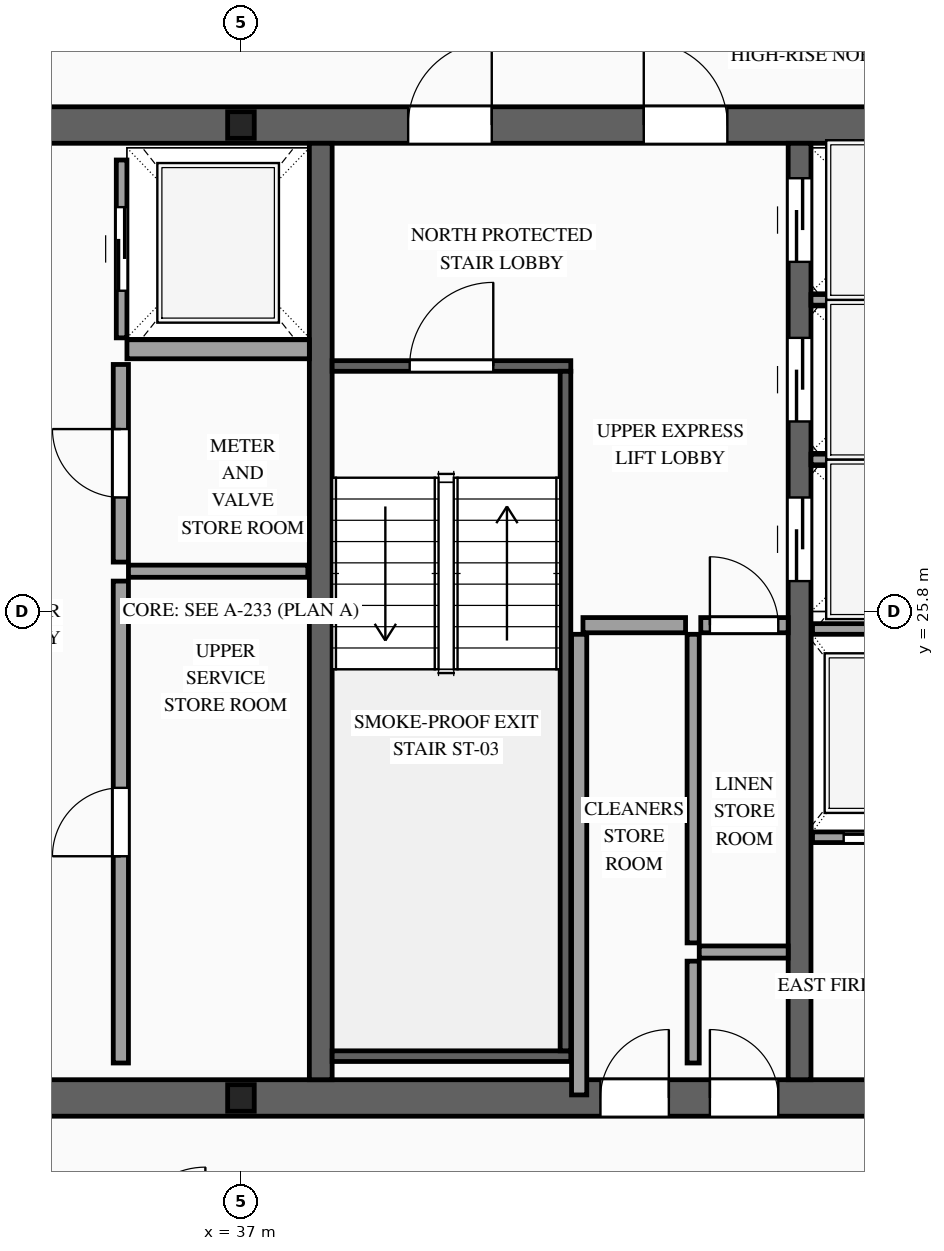
"""IFC4 building model, lengths in metres.
Left out: names, types, materials, properties, quantities, classifications, styles, units other than length and angle.
Written with IfcOpenShell. Run it as: python <this file> out.ifc"""

import sys

from ifc_helpers import new_model, si_unit, direction, frame, frame_2d, origin, origin_2d, place, context, subcontext, project, spatial, rectangle, i_section, extrude, source, transform, mapped, element, fill, save


model = new_model("IFC4")
c1 = context("Model", 3, precision=1e-05, world=origin(), true_north=direction((0.0, 1.0)))
c2 = subcontext(c1, "Body", "Model", "MODEL_VIEW")
j1 = project(units=[si_unit("LENGTHUNIT", "METRE"), si_unit("PLANEANGLEUNIT", "RADIAN")], contexts=[c1])
p1 = place(None, origin())
s1 = spatial("IfcSite", under=j1, at=p1, CompositionType="ELEMENT")
p2 = place(p1, origin())
s2 = spatial("IfcBuilding", under=s1, at=p2, CompositionType="ELEMENT")
p3 = place(p2, frame((0.0, 0.0, 318.2)))
s3 = spatial("IfcBuildingStorey", under=s2, at=p3, CompositionType="ELEMENT", Elevation=318.2)
p4 = place(p3, frame((23.56, 19.4, 0.0), z_axis=(0.0, 0.0, 1.0), x_axis=(1.0, 0.0, 0.0)))
e1 = element("IfcWall", 1, at=p4, inside=s3, PredefinedType="SHEAR", context=c2, shape_type="SweptSolid", body=[
    extrude(rectangle(XDim=26.88, YDim=0.48, at=frame_2d((13.44, 0.0))), origin(), (0.0, 0.0, 1.0), 3.5),
])
p5 = place(p4, frame((1.89, 0.0, 0.0)))
e2 = element("IfcOpeningElement", 2, at=p5, cuts=e1, PredefinedType="OPENING", context=c2, shape_type="SweptSolid", body=[
    extrude(rectangle(XDim=1.1, YDim=2.2, at=frame_2d((0.55, 1.1))), frame((0.0, 0.255, 0.0), z_axis=(0.0, -1.0, 0.0), x_axis=(1.0, 0.0, 0.0)), (0.0, 0.0, 1.0), 0.51),
])
p6 = place(p4, frame((9.79, 0.0, 0.0)))
e3 = element("IfcOpeningElement", 3, at=p6, cuts=e1, PredefinedType="OPENING", context=c2, shape_type="SweptSolid", body=[
    extrude(rectangle(XDim=1.1, YDim=2.2, at=frame_2d((0.55, 1.1))), frame((0.0, 0.255, 0.0), z_axis=(0.0, -1.0, 0.0), x_axis=(1.0, 0.0, 0.0)), (0.0, 0.0, 1.0), 0.51),
])
p7 = place(p4, frame((22.99, 0.0, 0.0)))
e4 = element("IfcOpeningElement", 4, at=p7, cuts=e1, PredefinedType="OPENING", context=c2, shape_type="SweptSolid", body=[
    extrude(rectangle(XDim=1.1, YDim=2.2, at=frame_2d((0.55, 1.1))), frame((0.0, 0.255, 0.0), z_axis=(0.0, -1.0, 0.0), x_axis=(1.0, 0.0, 0.0)), (0.0, 0.0, 1.0), 0.51),
])
p8 = place(p4, frame((19.61, 0.0, 0.0)))
e5 = element("IfcOpeningElement", 5, at=p8, cuts=e1, PredefinedType="OPENING", context=c2, shape_type="SweptSolid", body=[
    extrude(rectangle(XDim=0.9, YDim=2.15, at=frame_2d((0.45, 1.075))), frame((0.0, 0.255, 0.0), z_axis=(0.0, -1.0, 0.0), x_axis=(1.0, 0.0, 0.0)), (0.0, 0.0, 1.0), 0.51),
])
p9 = place(p4, frame((18.17, 0.0, 0.0)))
e6 = element("IfcOpeningElement", 6, at=p9, cuts=e1, PredefinedType="OPENING", context=c2, shape_type="SweptSolid", body=[
    extrude(rectangle(XDim=0.9, YDim=2.15, at=frame_2d((0.45, 1.075))), frame((0.0, 0.255, 0.0), z_axis=(0.0, -1.0, 0.0), x_axis=(1.0, 0.0, 0.0)), (0.0, 0.0, 1.0), 0.51),
])
p10 = place(p3, frame((23.56, 32.2, 0.0), z_axis=(0.0, 0.0, 1.0), x_axis=(1.0, 0.0, 0.0)))
e7 = element("IfcWall", 7, at=p10, inside=s3, PredefinedType="SHEAR", context=c2, shape_type="SweptSolid", body=[
    extrude(rectangle(XDim=26.88, YDim=0.48, at=frame_2d((13.44, 0.0))), origin(), (0.0, 0.0, 1.0), 3.5),
])
p11 = place(p10, frame((4.51, 0.0, 0.0)))
e8 = element("IfcOpeningElement", 8, at=p11, cuts=e7, PredefinedType="OPENING", context=c2, shape_type="SweptSolid", body=[
    extrude(rectangle(XDim=0.9, YDim=2.15, at=frame_2d((0.45, 1.075))), frame((0.0, 0.255, 0.0), z_axis=(0.0, -1.0, 0.0), x_axis=(1.0, 0.0, 0.0)), (0.0, 0.0, 1.0), 0.51),
])
p12 = place(p10, frame((9.79, 0.0, 0.0)))
e9 = element("IfcOpeningElement", 9, at=p12, cuts=e7, PredefinedType="OPENING", context=c2, shape_type="SweptSolid", body=[
    extrude(rectangle(XDim=1.1, YDim=2.2, at=frame_2d((0.55, 1.1))), frame((0.0, 0.255, 0.0), z_axis=(0.0, -1.0, 0.0), x_axis=(1.0, 0.0, 0.0)), (0.0, 0.0, 1.0), 0.51),
])
p13 = place(p10, frame((15.64, 0.0, 0.0)))
e10 = element("IfcOpeningElement", 10, at=p13, cuts=e7, PredefinedType="OPENING", context=c2, shape_type="SweptSolid", body=[
    extrude(rectangle(XDim=1.1, YDim=2.2, at=frame_2d((0.55, 1.1))), frame((0.0, 0.255, 0.0), z_axis=(0.0, -1.0, 0.0), x_axis=(1.0, 0.0, 0.0)), (0.0, 0.0, 1.0), 0.51),
])
p14 = place(p10, frame((18.74, 0.0, 0.0)))
e11 = element("IfcOpeningElement", 11, at=p14, cuts=e7, PredefinedType="OPENING", context=c2, shape_type="SweptSolid", body=[
    extrude(rectangle(XDim=1.1, YDim=2.2, at=frame_2d((0.55, 1.1))), frame((0.0, 0.255, 0.0), z_axis=(0.0, -1.0, 0.0), x_axis=(1.0, 0.0, 0.0)), (0.0, 0.0, 1.0), 0.51),
])
m1 = source(origin(), c2, "Body", "SweptSolid", [
    extrude(rectangle(XDim=12.32, YDim=0.3, at=frame_2d((6.16, 0.0))), origin(), (0.0, 0.0, 1.0), 3.5),
])
p15 = place(p3, frame((38.05, 19.64, 0.0), z_axis=(0.0, 0.0, 1.0), x_axis=(0.0, 1.0, 0.0)))
e12 = element("IfcWall", 12, at=p15, inside=s3, PredefinedType="SOLIDWALL", context=c2, shape_type="MappedRepresentation", body=[
    mapped(m1, transform((0.0, 0.0, 0.0), scale=1.0)),
])
p16 = place(p3, frame((44.35, 19.64, 0.0), z_axis=(0.0, 0.0, 1.0), x_axis=(0.0, 1.0, 0.0)))
e13 = element("IfcWall", 13, at=p16, inside=s3, PredefinedType="SOLIDWALL", context=c2, shape_type="SweptSolid", body=[
    extrude(rectangle(XDim=12.32, YDim=0.3, at=frame_2d((6.16, 0.0))), origin(), (0.0, 0.0, 1.0), 3.5),
])
p17 = place(p16, frame((6.56, 0.0, 0.0)))
e14 = element("IfcOpeningElement", 14, at=p17, cuts=e13, PredefinedType="OPENING", context=c2, shape_type="SweptSolid", body=[
    extrude(rectangle(XDim=1.1, YDim=2.2, at=frame_2d((0.55, 1.1))), frame((0.0, 0.165, 0.0), z_axis=(0.0, -1.0, 0.0), x_axis=(1.0, 0.0, 0.0)), (0.0, 0.0, 1.0), 0.33),
])
p18 = place(p16, frame((8.66, 0.0, 0.0)))
e15 = element("IfcOpeningElement", 15, at=p18, cuts=e13, PredefinedType="OPENING", context=c2, shape_type="SweptSolid", body=[
    extrude(rectangle(XDim=1.1, YDim=2.2, at=frame_2d((0.55, 1.1))), frame((0.0, 0.165, 0.0), z_axis=(0.0, -1.0, 0.0), x_axis=(1.0, 0.0, 0.0)), (0.0, 0.0, 1.0), 0.33),
])
p19 = place(p16, frame((10.76, 0.0, 0.0)))
e16 = element("IfcOpeningElement", 16, at=p19, cuts=e13, PredefinedType="OPENING", context=c2, shape_type="SweptSolid", body=[
    extrude(rectangle(XDim=1.1, YDim=2.2, at=frame_2d((0.55, 1.1))), frame((0.0, 0.165, 0.0), z_axis=(0.0, -1.0, 0.0), x_axis=(1.0, 0.0, 0.0)), (0.0, 0.0, 1.0), 0.33),
])
m2 = source(origin(), c2, "Body", "SweptSolid", [
    extrude(i_section(OverallWidth=0.35, OverallDepth=0.35, WebThickness=0.012, FlangeThickness=0.019, at=origin_2d()), origin(), (0.0, 0.0, 1.0), 3.5),
])
for number, where, z_axis, x_axis in (
    (17, (37.0, 19.4, 0.0), (0.0, 0.0, 1.0), (1.0, 0.0, 0.0)),
    (18, (37.0, 32.2, 0.0), (0.0, 0.0, 1.0), (1.0, 0.0, 0.0)),
):
    element("IfcColumn", number, at=place(p3, frame(where, z_axis=z_axis, x_axis=x_axis)), inside=s3, PredefinedType="COLUMN", context=c2, shape_type="MappedRepresentation", body=[
        mapped(m2, transform((0.0, 0.0, 0.0), scale=1.0)),
    ])
p20 = place(p3, frame((44.52, 22.83, 0.0), z_axis=(0.0, 0.0, 1.0), x_axis=(1.0, 0.0, 0.0)))
e19 = element("IfcWall", 19, at=p20, inside=s3, PredefinedType="SOLIDWALL", context=c2, shape_type="SweptSolid", body=[
    extrude(rectangle(XDim=1.92, YDim=0.14, at=frame_2d((0.96, 0.0))), origin(), (0.0, 0.0, 1.0), 3.28),
])
p21 = place(p20, frame((0.41, 0.0, 0.0)))
e20 = element("IfcOpeningElement", 20, at=p21, cuts=e19, PredefinedType="OPENING", context=c2, shape_type="SweptSolid", body=[
    extrude(rectangle(XDim=1.1, YDim=2.2, at=frame_2d((0.55, 1.1))), frame((0.0, 0.085, 0.0), z_axis=(0.0, -1.0, 0.0), x_axis=(1.0, 0.0, 0.0)), (0.0, 0.0, 1.0), 0.17),
])
m3 = source(origin(), c2, "Body", "SweptSolid", [
    extrude(rectangle(XDim=1.92, YDim=0.14, at=frame_2d((0.96, 0.0))), origin(), (0.0, 0.0, 1.0), 3.28),
])
p22 = place(p3, frame((44.52, 25.57, 0.0), z_axis=(0.0, 0.0, 1.0), x_axis=(1.0, 0.0, 0.0)))
e21 = element("IfcWall", 21, at=p22, inside=s3, PredefinedType="SOLIDWALL", context=c2, shape_type="MappedRepresentation", body=[
    mapped(m3, transform((0.0, 0.0, 0.0), scale=1.0)),
])
p23 = place(p3, frame((35.43, 29.4, 0.0), z_axis=(0.0, 0.0, 1.0), x_axis=(0.0, 1.0, 0.0)))
e22 = element("IfcWall", 22, at=p23, inside=s3, PredefinedType="SOLIDWALL", context=c2, shape_type="SweptSolid", body=[
    extrude(rectangle(XDim=2.34, YDim=0.14, at=frame_2d((1.17, 0.0))), origin(), (0.0, 0.0, 1.0), 3.28),
])
p24 = place(p23, frame((0.62, 0.0, 0.0)))
e23 = element("IfcOpeningElement", 23, at=p24, cuts=e22, PredefinedType="OPENING", context=c2, shape_type="SweptSolid", body=[
    extrude(rectangle(XDim=1.1, YDim=2.2, at=frame_2d((0.55, 1.1))), frame((0.0, 0.085, 0.0), z_axis=(0.0, -1.0, 0.0), x_axis=(1.0, 0.0, 0.0)), (0.0, 0.0, 1.0), 0.17),
])
m4 = source(origin(), c2, "Body", "SweptSolid", [
    extrude(rectangle(XDim=2.4, YDim=0.25, at=frame_2d((1.2, 0.0))), origin(), (0.0, 0.0, 1.0), 3.28),
])
p25 = place(p3, frame((35.5, 29.25, 0.0), z_axis=(0.0, 0.0, 1.0), x_axis=(1.0, 0.0, 0.0)))
e24 = element("IfcWall", 24, at=p25, inside=s3, PredefinedType="SOLIDWALL", context=c2, shape_type="MappedRepresentation", body=[
    mapped(m4, transform((0.0, 0.0, 0.0), scale=1.0)),
])
m5 = source(origin(), c2, "Body", "SweptSolid", [
    extrude(rectangle(XDim=2.0, YDim=0.14, at=frame_2d((1.0, 0.0))), origin(), (0.0, 0.0, 1.0), 3.28),
])
for number, where, z_axis, x_axis in (
    (25, (44.5, 27.8, 0.0), (0.0, 0.0, 1.0), (1.0, 0.0, 0.0)),
    (26, (44.5, 29.9, 0.0), (0.0, 0.0, 1.0), (1.0, 0.0, 0.0)),
):
    element("IfcWall", number, at=place(p3, frame(where, z_axis=z_axis, x_axis=x_axis)), inside=s3, PredefinedType="SOLIDWALL", context=c2, shape_type="MappedRepresentation", body=[
        mapped(m5, transform((0.0, 0.0, 0.0), scale=1.0)),
    ])
p26 = place(p3, frame((38.2, 29.03, 0.0), z_axis=(0.0, 0.0, 1.0), x_axis=(1.0, 0.0, 0.0)))
e27 = element("IfcWall", 27, at=p26, inside=s3, PredefinedType="SOLIDWALL", context=c2, shape_type="SweptSolid", body=[
    extrude(rectangle(XDim=3.14, YDim=0.14, at=frame_2d((1.57, 0.0))), origin(), (0.0, 0.0, 1.0), 3.28),
])
p27 = place(p26, frame((1.02, 0.0, 0.0)))
e28 = element("IfcOpeningElement", 28, at=p27, cuts=e27, PredefinedType="OPENING", context=c2, shape_type="SweptSolid", body=[
    extrude(rectangle(XDim=1.1, YDim=2.2, at=frame_2d((0.55, 1.1))), frame((0.0, 0.085, 0.0), z_axis=(0.0, -1.0, 0.0), x_axis=(1.0, 0.0, 0.0)), (0.0, 0.0, 1.0), 0.17),
])
m6 = source(origin(), c2, "Body", "SweptSolid", [
    extrude(rectangle(XDim=3.14, YDim=0.14, at=frame_2d((1.57, 0.0))), origin(), (0.0, 0.0, 1.0), 3.28),
])
p28 = place(p3, frame((38.2, 19.95, 0.0), z_axis=(0.0, 0.0, 1.0), x_axis=(1.0, 0.0, 0.0)))
e29 = element("IfcWall", 29, at=p28, inside=s3, PredefinedType="SOLIDWALL", context=c2, shape_type="MappedRepresentation", body=[
    mapped(m6, transform((0.0, 0.0, 0.0), scale=1.0)),
])
m7 = source(origin(), c2, "Body", "SweptSolid", [
    extrude(rectangle(XDim=8.94, YDim=0.14, at=frame_2d((4.47, 0.0))), origin(), (0.0, 0.0, 1.0), 3.28),
])
p29 = place(p3, frame((41.27, 20.02, 0.0), z_axis=(0.0, 0.0, 1.0), x_axis=(0.0, 1.0, 0.0)))
e30 = element("IfcWall", 30, at=p29, inside=s3, PredefinedType="SOLIDWALL", context=c2, shape_type="MappedRepresentation", body=[
    mapped(m7, transform((0.0, 0.0, 0.0), scale=1.0)),
])
p30 = place(p3, frame((35.42, 19.86, 0.0), z_axis=(0.0, 0.0, 1.0), x_axis=(0.0, 1.0, 0.0)))
e31 = element("IfcWall", 31, at=p30, inside=s3, PredefinedType="PARTITIONING", context=c2, shape_type="SweptSolid", body=[
    extrude(rectangle(XDim=6.34, YDim=0.2, at=frame_2d((3.17, 0.0))), origin(), (0.0, 0.0, 1.0), 3.28),
])
p31 = place(p30, frame((2.72, 0.0, 0.0)))
e32 = element("IfcOpeningElement", 32, at=p31, cuts=e31, PredefinedType="OPENING", context=c2, shape_type="SweptSolid", body=[
    extrude(rectangle(XDim=0.9, YDim=2.15, at=frame_2d((0.45, 1.075))), frame((0.0, 0.115, 0.0), z_axis=(0.0, -1.0, 0.0), x_axis=(1.0, 0.0, 0.0)), (0.0, 0.0, 1.0), 0.23),
])
p32 = place(p3, frame((35.42, 26.45, 0.0), z_axis=(0.0, 0.0, 1.0), x_axis=(0.0, 1.0, 0.0)))
e33 = element("IfcWall", 33, at=p32, inside=s3, PredefinedType="PARTITIONING", context=c2, shape_type="SweptSolid", body=[
    extrude(rectangle(XDim=2.6, YDim=0.2, at=frame_2d((1.3, 0.0))), origin(), (0.0, 0.0, 1.0), 3.28),
])
p33 = place(p32, frame((0.85, 0.0, 0.0)))
e34 = element("IfcOpeningElement", 34, at=p33, cuts=e33, PredefinedType="OPENING", context=c2, shape_type="SweptSolid", body=[
    extrude(rectangle(XDim=0.9, YDim=2.15, at=frame_2d((0.45, 1.075))), frame((0.0, 0.115, 0.0), z_axis=(0.0, -1.0, 0.0), x_axis=(1.0, 0.0, 0.0)), (0.0, 0.0, 1.0), 0.23),
])
m8 = source(origin(), c2, "Body", "SweptSolid", [
    extrude(rectangle(XDim=2.36, YDim=0.16, at=frame_2d((1.18, 0.0))), origin(), (0.0, 0.0, 1.0), 3.28),
])
p34 = place(p3, frame((35.52, 26.33, 0.0), z_axis=(0.0, 0.0, 1.0), x_axis=(1.0, 0.0, 0.0)))
e35 = element("IfcWall", 35, at=p34, inside=s3, PredefinedType="PARTITIONING", context=c2, shape_type="MappedRepresentation", body=[
    mapped(m8, transform((0.0, 0.0, 0.0), scale=1.0)),
])
m9 = source(origin(), c2, "Body", "SweptSolid", [
    extrude(rectangle(XDim=1.34, YDim=0.16, at=frame_2d((0.67, 0.0))), origin(), (0.0, 0.0, 1.0), 3.28),
])
p35 = place(p3, frame((42.95, 19.86, 0.0), z_axis=(0.0, 0.0, 1.0), x_axis=(0.0, 1.0, 0.0)))
e36 = element("IfcWall", 36, at=p35, inside=s3, PredefinedType="PARTITIONING", context=c2, shape_type="MappedRepresentation", body=[
    mapped(m9, transform((0.0, 0.0, 0.0), scale=1.0)),
])
m10 = source(origin(), c2, "Body", "SweptSolid", [
    extrude(rectangle(XDim=1.17, YDim=0.16, at=frame_2d((0.585, 0.0))), origin(), (0.0, 0.0, 1.0), 3.28),
])
p36 = place(p3, frame((43.03, 21.32, 0.0), z_axis=(0.0, 0.0, 1.0), x_axis=(1.0, 0.0, 0.0)))
e37 = element("IfcWall", 37, at=p36, inside=s3, PredefinedType="PARTITIONING", context=c2, shape_type="MappedRepresentation", body=[
    mapped(m10, transform((0.0, 0.0, 0.0), scale=1.0)),
])
m11 = source(origin(), c2, "Body", "SweptSolid", [
    extrude(rectangle(XDim=6.06, YDim=0.2, at=frame_2d((3.03, 0.0))), origin(), (0.0, 0.0, 1.0), 3.28),
])
p37 = place(p3, frame((41.45, 19.44, 0.0), z_axis=(0.0, 0.0, 1.0), x_axis=(0.0, 1.0, 0.0)))
e38 = element("IfcWall", 38, at=p37, inside=s3, PredefinedType="PARTITIONING", context=c2, shape_type="MappedRepresentation", body=[
    mapped(m11, transform((0.0, 0.0, 0.0), scale=1.0)),
])
m12 = source(origin(), c2, "Body", "SweptSolid", [
    extrude(rectangle(XDim=1.35, YDim=0.2, at=frame_2d((0.675, 0.0))), origin(), (0.0, 0.0, 1.0), 3.28),
])
p38 = place(p3, frame((41.5, 25.62, 0.0), z_axis=(0.0, 0.0, 1.0), x_axis=(1.0, 0.0, 0.0)))
e39 = element("IfcWall", 39, at=p38, inside=s3, PredefinedType="PARTITIONING", context=c2, shape_type="MappedRepresentation", body=[
    mapped(m12, transform((0.0, 0.0, 0.0), scale=1.0)),
])
m13 = source(origin(), c2, "Body", "SweptSolid", [
    extrude(rectangle(XDim=4.06, YDim=0.16, at=frame_2d((2.03, 0.0))), origin(), (0.0, 0.0, 1.0), 3.28),
])
p39 = place(p3, frame((42.95, 21.44, 0.0), z_axis=(0.0, 0.0, 1.0), x_axis=(0.0, 1.0, 0.0)))
e40 = element("IfcWall", 40, at=p39, inside=s3, PredefinedType="PARTITIONING", context=c2, shape_type="MappedRepresentation", body=[
    mapped(m13, transform((0.0, 0.0, 0.0), scale=1.0)),
])
p40 = place(p3, frame((43.05, 25.62, 0.0), z_axis=(0.0, 0.0, 1.0), x_axis=(1.0, 0.0, 0.0)))
e41 = element("IfcWall", 41, at=p40, inside=s3, PredefinedType="PARTITIONING", context=c2, shape_type="SweptSolid", body=[
    extrude(rectangle(XDim=1.15, YDim=0.2, at=frame_2d((0.575, 0.0))), origin(), (0.0, 0.0, 1.0), 3.28),
])
p41 = place(p40, frame((0.12, 0.0, 0.0)))
e42 = element("IfcOpeningElement", 42, at=p41, cuts=e41, PredefinedType="OPENING", context=c2, shape_type="SweptSolid", body=[
    extrude(rectangle(XDim=0.9, YDim=2.15, at=frame_2d((0.45, 1.075))), frame((0.0, 0.115, 0.0), z_axis=(0.0, -1.0, 0.0), x_axis=(1.0, 0.0, 0.0)), (0.0, 0.0, 1.0), 0.23),
])
m14 = source(origin(), c2, "Body", "SweptSolid", [
    extrude(rectangle(XDim=1.1, YDim=2.2, at=frame_2d((0.55, 1.1))), frame((0.0, 0.025, 0.0), z_axis=(0.0, -1.0, 0.0), x_axis=(1.0, 0.0, 0.0)), (0.0, 0.0, 1.0), 0.05),
])
p42 = place(p21, origin())
e43 = element("IfcDoor", 43, at=p42, inside=s3, OperationType="SLIDING_TO_RIGHT", PredefinedType="DOOR", context=c2, shape_type="MappedRepresentation", body=[
    mapped(m14, transform((0.0, 0.0, 0.0), scale=1.0)),
])
fill(e20, e43)
p43 = place(p24, origin())
e44 = element("IfcDoor", 44, at=p43, inside=s3, OperationType="SLIDING_TO_RIGHT", PredefinedType="DOOR", context=c2, shape_type="MappedRepresentation", body=[
    mapped(m14, transform((0.0, 0.0, 0.0), scale=1.0)),
])
fill(e23, e44)
p44 = place(p17, origin())
e45 = element("IfcDoor", 45, at=p44, inside=s3, OperationType="SLIDING_TO_LEFT", PredefinedType="DOOR", context=c2, shape_type="MappedRepresentation", body=[
    mapped(m14, transform((0.0, 0.0, 0.0), scale=1.0)),
])
fill(e14, e45)
p45 = place(p18, origin())
e46 = element("IfcDoor", 46, at=p45, inside=s3, OperationType="SLIDING_TO_RIGHT", PredefinedType="DOOR", context=c2, shape_type="MappedRepresentation", body=[
    mapped(m14, transform((0.0, 0.0, 0.0), scale=1.0)),
])
fill(e15, e46)
p46 = place(p19, origin())
e47 = element("IfcDoor", 47, at=p46, inside=s3, OperationType="SLIDING_TO_LEFT", PredefinedType="DOOR", context=c2, shape_type="MappedRepresentation", body=[
    mapped(m14, transform((0.0, 0.0, 0.0), scale=1.0)),
])
fill(e16, e47)
m15 = source(origin(), c2, "Body", "SweptSolid", [
    extrude(rectangle(XDim=1.1, YDim=2.2, at=frame_2d((0.55, 1.1))), frame((0.0, 0.025, 0.0), z_axis=(0.0, -1.0, 0.0), x_axis=(1.0, 0.0, 0.0)), (0.0, 0.0, 1.0), 0.05),
])
p47 = place(p27, origin())
e48 = element("IfcDoor", 48, at=p47, inside=s3, OperationType="SINGLE_SWING_RIGHT", PredefinedType="DOOR", context=c2, shape_type="MappedRepresentation", body=[
    mapped(m15, transform((0.0, 0.0, 0.0), scale=1.0)),
])
fill(e28, e48)
p48 = place(p13, origin())
e49 = element("IfcDoor", 49, at=p48, inside=s3, OperationType="SINGLE_SWING_RIGHT", PredefinedType="DOOR", context=c2, shape_type="MappedRepresentation", body=[
    mapped(m15, transform((0.0, 0.0, 0.0), scale=1.0)),
])
fill(e10, e49)
p49 = place(p14, origin())
e50 = element("IfcDoor", 50, at=p49, inside=s3, OperationType="SINGLE_SWING_LEFT", PredefinedType="DOOR", context=c2, shape_type="MappedRepresentation", body=[
    mapped(m15, transform((0.0, 0.0, 0.0), scale=1.0)),
])
fill(e11, e50)
m16 = source(origin(), c2, "Body", "SweptSolid", [
    extrude(rectangle(XDim=0.9, YDim=2.15, at=frame_2d((0.45, 1.075))), frame((0.0, 0.025, 0.0), z_axis=(0.0, -1.0, 0.0), x_axis=(1.0, 0.0, 0.0)), (0.0, 0.0, 1.0), 0.05),
])
p50 = place(p31, origin())
e51 = element("IfcDoor", 51, at=p50, inside=s3, OperationType="SINGLE_SWING_LEFT", PredefinedType="DOOR", context=c2, shape_type="MappedRepresentation", body=[
    mapped(m16, transform((0.0, 0.0, 0.0), scale=1.0)),
])
fill(e32, e51)
p51 = place(p33, origin())
e52 = element("IfcDoor", 52, at=p51, inside=s3, OperationType="SINGLE_SWING_RIGHT", PredefinedType="DOOR", context=c2, shape_type="MappedRepresentation", body=[
    mapped(m16, transform((0.0, 0.0, 0.0), scale=1.0)),
])
fill(e34, e52)
p52 = place(p8, origin())
e53 = element("IfcDoor", 53, at=p52, inside=s3, OperationType="SINGLE_SWING_LEFT", PredefinedType="DOOR", context=c2, shape_type="MappedRepresentation", body=[
    mapped(m16, transform((0.0, 0.0, 0.0), scale=1.0)),
])
fill(e5, e53)
p53 = place(p9, origin())
e54 = element("IfcDoor", 54, at=p53, inside=s3, OperationType="SINGLE_SWING_RIGHT", PredefinedType="DOOR", context=c2, shape_type="MappedRepresentation", body=[
    mapped(m16, transform((0.0, 0.0, 0.0), scale=1.0)),
])
fill(e6, e54)
p54 = place(p41, origin())
e55 = element("IfcDoor", 55, at=p54, inside=s3, OperationType="SINGLE_SWING_LEFT", PredefinedType="DOOR", context=c2, shape_type="MappedRepresentation", body=[
    mapped(m16, transform((0.0, 0.0, 0.0), scale=1.0)),
])
fill(e42, e55)
save(model, sys.argv[1])
